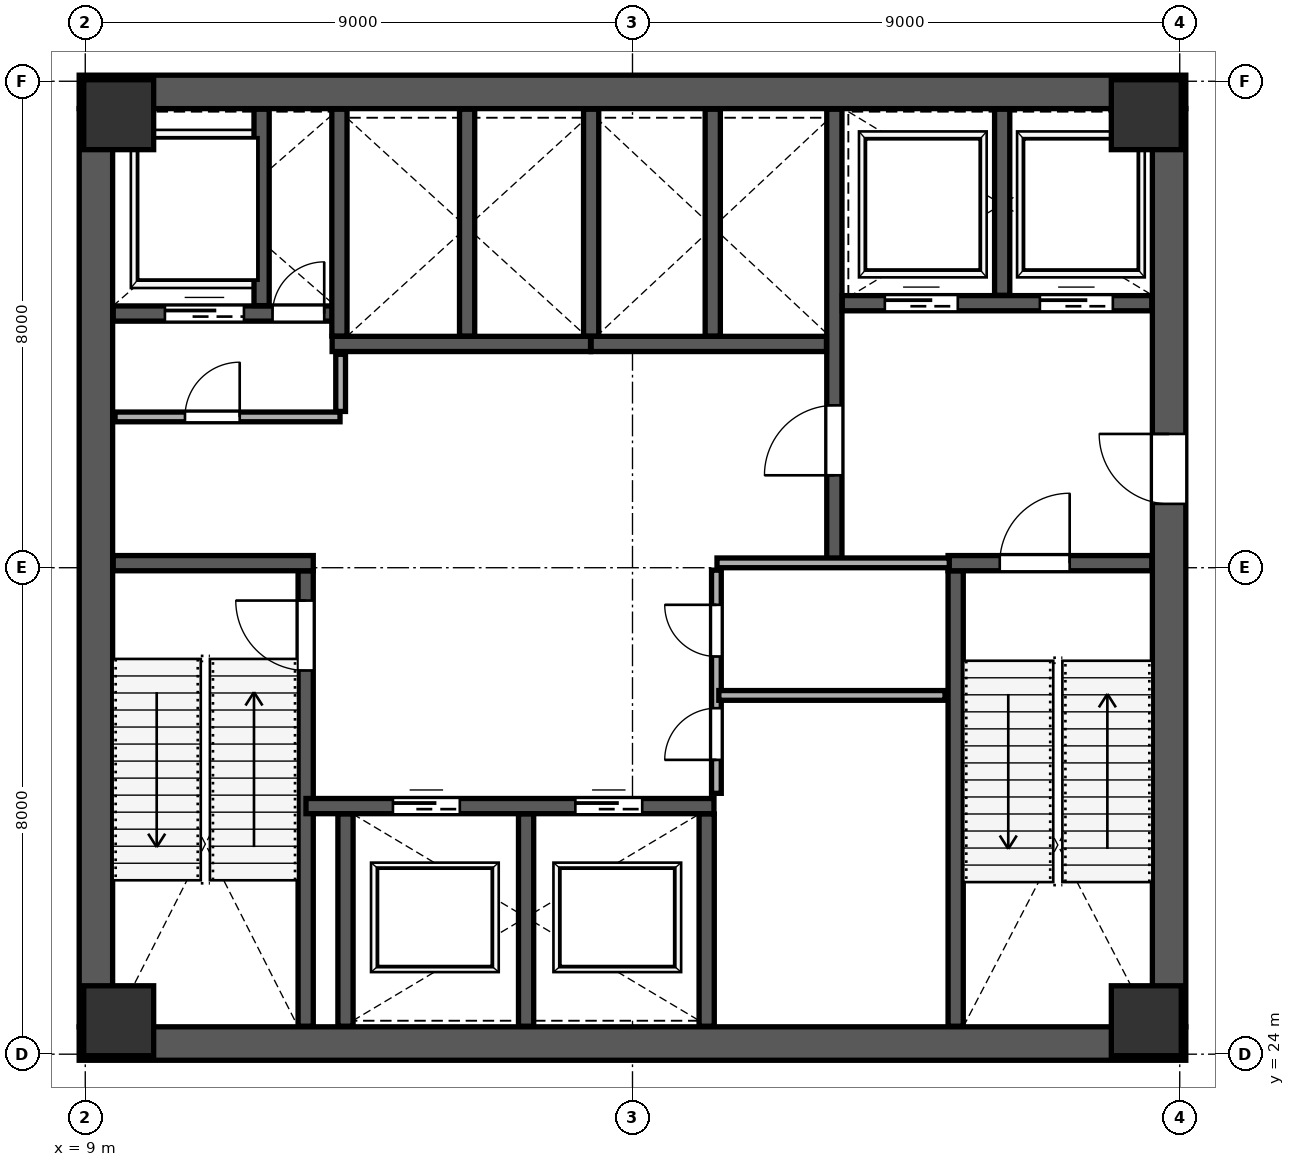
"""IFC4 building model, lengths in metres.
Left out: names, types, materials, properties, quantities, classifications, styles, units other than length and angle.
Written with IfcOpenShell. Run it as: python <this file> out.ifc"""

import sys

from ifc_helpers import new_model, si_unit, direction, frame, frame_2d, origin, origin_2d, place, context, subcontext, project, spatial, rectangle, extrude, source, transform, mapped, element, fill, save


model = new_model("IFC4")
c1 = context("Model", 3, precision=1e-05, world=origin(), true_north=direction((0.0, 1.0)))
c2 = subcontext(c1, "Body", "Model", "MODEL_VIEW")
j1 = project(units=[si_unit("LENGTHUNIT", "METRE"), si_unit("PLANEANGLEUNIT", "RADIAN")], contexts=[c1])
p1 = place(None, origin())
s1 = spatial("IfcSite", under=j1, at=p1, CompositionType="ELEMENT")
p2 = place(p1, origin())
s2 = spatial("IfcBuilding", under=s1, at=p2, CompositionType="ELEMENT")
p3 = place(p2, frame((0.0, 0.0, 56.8)))
s3 = spatial("IfcBuildingStorey", under=s2, at=p3, CompositionType="ELEMENT", Elevation=56.8)
m1 = source(origin(), c2, "Body", "SweptSolid", [
    extrude(rectangle(XDim=1.15, YDim=1.15, at=origin_2d()), origin(), (0.0, 0.0, 1.0), 4.799),
])
for number, where, z_axis, x_axis in (
    (1, (9.55, 24.55, 0.001), (0.0, 0.0, 1.0), (1.0, 0.0, 0.0)),
    (2, (26.45, 24.55, 0.001), (0.0, 0.0, 1.0), (1.0, 0.0, 0.0)),
    (3, (9.55, 39.45, 0.001), (0.0, 0.0, 1.0), (1.0, 0.0, 0.0)),
    (4, (26.45, 39.45, 0.001), (0.0, 0.0, 1.0), (1.0, 0.0, 0.0)),
):
    element("IfcColumn", number, at=place(p3, frame(where, z_axis=z_axis, x_axis=x_axis)), inside=s3, PredefinedType="COLUMN", context=c2, shape_type="MappedRepresentation", body=[
        mapped(m1, transform((0.0, 0.0, 0.0), scale=1.0)),
    ])
p4 = place(p3, frame((9.175, 24.45, 0.0), z_axis=(0.0, 0.0, 1.0), x_axis=(0.0, 1.0, 0.0)))
e5 = element("IfcWall", 5, at=p4, inside=s3, PredefinedType="SHEAR", context=c2, shape_type="SweptSolid", body=[
    extrude(rectangle(XDim=15.1, YDim=0.55, at=frame_2d((7.55, 0.0))), origin(), (0.0, 0.0, 1.0), 4.56),
])
p5 = place(p3, frame((26.825, 24.45, 0.0), z_axis=(0.0, 0.0, 1.0), x_axis=(0.0, 1.0, 0.0)))
e6 = element("IfcWall", 6, at=p5, inside=s3, PredefinedType="SHEAR", context=c2, shape_type="SweptSolid", body=[
    extrude(rectangle(XDim=15.1, YDim=0.55, at=frame_2d((7.55, 0.0))), origin(), (0.0, 0.0, 1.0), 4.56),
])
p6 = place(p5, frame((8.6, 0.0, 0.0)))
e7 = element("IfcOpeningElement", 7, at=p6, cuts=e6, PredefinedType="OPENING", context=c2, shape_type="SweptSolid", body=[
    extrude(rectangle(XDim=1.15, YDim=2.2, at=frame_2d((0.575, 1.1))), frame((0.0, 0.285, 0.0), z_axis=(0.0, -1.0, 0.0), x_axis=(1.0, 0.0, 0.0)), (0.0, 0.0, 1.0), 0.57),
])
for number, where, z_axis, x_axis in (
    (8, (8.9, 24.175, 0.0), (0.0, 0.0, 1.0), (1.0, 0.0, 0.0)),
    (9, (8.9, 39.825, 0.0), (0.0, 0.0, 1.0), (1.0, 0.0, 0.0)),
):
    element("IfcWall", number, at=place(p3, frame(where, z_axis=z_axis, x_axis=x_axis)), inside=s3, PredefinedType="SHEAR", context=c2, shape_type="SweptSolid", body=[
        extrude(rectangle(XDim=18.2, YDim=0.55, at=frame_2d((9.1, 0.0))), origin(), (0.0, 0.0, 1.0), 4.56),
    ])
p7 = place(p3, frame((12.625, 24.46, 0.0), z_axis=(0.0, 0.0, 1.0), x_axis=(0.0, 1.0, 0.0)))
e10 = element("IfcWall", 10, at=p7, inside=s3, PredefinedType="SHEAR", context=c2, shape_type="SweptSolid", body=[
    extrude(rectangle(XDim=7.49, YDim=0.25, at=frame_2d((3.745, 0.0))), origin(), (0.0, 0.0, 1.0), 4.56),
])
p8 = place(p7, frame((5.85, 0.0, 0.0)))
e11 = element("IfcOpeningElement", 11, at=p8, cuts=e10, PredefinedType="OPENING", context=c2, shape_type="SweptSolid", body=[
    extrude(rectangle(XDim=1.15, YDim=2.2, at=frame_2d((0.575, 1.1))), frame((0.0, 0.135, 0.0), z_axis=(0.0, -1.0, 0.0), x_axis=(1.0, 0.0, 0.0)), (0.0, 0.0, 1.0), 0.27),
])
p9 = place(p3, frame((9.46, 32.075, 0.0), z_axis=(0.0, 0.0, 1.0), x_axis=(1.0, 0.0, 0.0)))
e12 = element("IfcWall", 12, at=p9, inside=s3, PredefinedType="SHEAR", context=c2, shape_type="SweptSolid", body=[
    extrude(rectangle(XDim=3.29, YDim=0.25, at=frame_2d((1.645, 0.0))), origin(), (0.0, 0.0, 1.0), 4.56),
])
p10 = place(p3, frame((23.315, 24.46, 0.0), z_axis=(0.0, 0.0, 1.0), x_axis=(0.0, 1.0, 0.0)))
e13 = element("IfcWall", 13, at=p10, inside=s3, PredefinedType="SHEAR", context=c2, shape_type="SweptSolid", body=[
    extrude(rectangle(XDim=7.49, YDim=0.25, at=frame_2d((3.745, 0.0))), origin(), (0.0, 0.0, 1.0), 4.56),
])
p11 = place(p3, frame((23.19, 32.075, 0.0), z_axis=(0.0, 0.0, 1.0), x_axis=(1.0, 0.0, 0.0)))
e14 = element("IfcWall", 14, at=p11, inside=s3, PredefinedType="SHEAR", context=c2, shape_type="SweptSolid", body=[
    extrude(rectangle(XDim=3.35, YDim=0.25, at=frame_2d((1.675, 0.0))), origin(), (0.0, 0.0, 1.0), 4.56),
])
p12 = place(p11, frame((0.85, 0.0, 0.0)))
e15 = element("IfcOpeningElement", 15, at=p12, cuts=e14, PredefinedType="OPENING", context=c2, shape_type="SweptSolid", body=[
    extrude(rectangle(XDim=1.15, YDim=2.2, at=frame_2d((0.575, 1.1))), frame((0.0, 0.135, 0.0), z_axis=(0.0, -1.0, 0.0), x_axis=(1.0, 0.0, 0.0)), (0.0, 0.0, 1.0), 0.27),
])
p13 = place(p3, frame((21.32, 32.12, 0.0), z_axis=(0.0, 0.0, 1.0), x_axis=(0.0, 1.0, 0.0)))
e16 = element("IfcWall", 16, at=p13, inside=s3, PredefinedType="SHEAR", context=c2, shape_type="SweptSolid", body=[
    extrude(rectangle(XDim=7.42, YDim=0.25, at=frame_2d((3.71, 0.0))), origin(), (0.0, 0.0, 1.0), 4.56),
])
p14 = place(p13, frame((1.4, 0.0, 0.0)))
e17 = element("IfcOpeningElement", 17, at=p14, cuts=e16, PredefinedType="OPENING", context=c2, shape_type="SweptSolid", body=[
    extrude(rectangle(XDim=1.15, YDim=2.2, at=frame_2d((0.575, 1.1))), frame((0.0, 0.135, 0.0), z_axis=(0.0, -1.0, 0.0), x_axis=(1.0, 0.0, 0.0)), (0.0, 0.0, 1.0), 0.27),
])
p15 = place(p3, frame((9.46, 36.18, 0.0), z_axis=(0.0, 0.0, 1.0), x_axis=(1.0, 0.0, 0.0)))
e18 = element("IfcWall", 18, at=p15, inside=s3, PredefinedType="SHEAR", context=c2, shape_type="SweptSolid", body=[
    extrude(rectangle(XDim=3.79, YDim=0.25, at=frame_2d((1.895, 0.0))), origin(), (0.0, 0.0, 1.0), 4.56),
])
p16 = place(p15, frame((2.62, 0.0, 0.0)))
e19 = element("IfcOpeningElement", 19, at=p16, cuts=e18, PredefinedType="OPENING", context=c2, shape_type="SweptSolid", body=[
    extrude(rectangle(XDim=0.85, YDim=2.1, at=frame_2d((0.425, 1.05))), frame((0.0, 0.135, 0.0), z_axis=(0.0, -1.0, 0.0), x_axis=(1.0, 0.0, 0.0)), (0.0, 0.0, 1.0), 0.27),
])
p17 = place(p15, frame((0.85, 0.0, 0.0)))
e20 = element("IfcOpeningElement", 20, at=p17, cuts=e18, PredefinedType="OPENING", context=c2, shape_type="SweptSolid", body=[
    extrude(rectangle(XDim=1.3, YDim=2.25, at=frame_2d((0.65, 1.125))), frame((0.0, 0.135, 0.0), z_axis=(0.0, -1.0, 0.0), x_axis=(1.0, 0.0, 0.0)), (0.0, 0.0, 1.0), 0.27),
])
p18 = place(p3, frame((11.9, 36.31, 0.0), z_axis=(0.0, 0.0, 1.0), x_axis=(0.0, 1.0, 0.0)))
e21 = element("IfcWall", 21, at=p18, inside=s3, PredefinedType="SHEAR", context=c2, shape_type="SweptSolid", body=[
    extrude(rectangle(XDim=3.23, YDim=0.25, at=frame_2d((1.615, 0.0))), origin(), (0.0, 0.0, 1.0), 4.56),
])
p19 = place(p3, frame((21.45, 36.35, 0.0), z_axis=(0.0, 0.0, 1.0), x_axis=(1.0, 0.0, 0.0)))
e22 = element("IfcWall", 22, at=p19, inside=s3, PredefinedType="SHEAR", context=c2, shape_type="SweptSolid", body=[
    extrude(rectangle(XDim=5.09, YDim=0.25, at=frame_2d((2.545, 0.0))), origin(), (0.0, 0.0, 1.0), 4.56),
])
p20 = place(p19, frame((0.7, 0.0, 0.0)))
e23 = element("IfcOpeningElement", 23, at=p20, cuts=e22, PredefinedType="OPENING", context=c2, shape_type="SweptSolid", body=[
    extrude(rectangle(XDim=1.2, YDim=2.2, at=frame_2d((0.6, 1.1))), frame((0.0, 0.135, 0.0), z_axis=(0.0, -1.0, 0.0), x_axis=(1.0, 0.0, 0.0)), (0.0, 0.0, 1.0), 0.27),
])
p21 = place(p19, frame((3.25, 0.0, 0.0)))
e24 = element("IfcOpeningElement", 24, at=p21, cuts=e22, PredefinedType="OPENING", context=c2, shape_type="SweptSolid", body=[
    extrude(rectangle(XDim=1.2, YDim=2.2, at=frame_2d((0.6, 1.1))), frame((0.0, 0.135, 0.0), z_axis=(0.0, -1.0, 0.0), x_axis=(1.0, 0.0, 0.0)), (0.0, 0.0, 1.0), 0.27),
])
p22 = place(p3, frame((24.08, 36.48, 0.0), z_axis=(0.0, 0.0, 1.0), x_axis=(0.0, 1.0, 0.0)))
e25 = element("IfcWall", 25, at=p22, inside=s3, PredefinedType="SHEAR", context=c2, shape_type="SweptSolid", body=[
    extrude(rectangle(XDim=3.06, YDim=0.25, at=frame_2d((1.53, 0.0))), origin(), (0.0, 0.0, 1.0), 4.56),
])
p23 = place(p3, frame((12.63, 28.08, 0.0), z_axis=(0.0, 0.0, 1.0), x_axis=(1.0, 0.0, 0.0)))
e26 = element("IfcWall", 26, at=p23, inside=s3, PredefinedType="SHEAR", context=c2, shape_type="SweptSolid", body=[
    extrude(rectangle(XDim=6.71, YDim=0.25, at=frame_2d((3.355, 0.0))), origin(), (0.0, 0.0, 1.0), 4.56),
])
p24 = place(p23, frame((1.43, 0.0, 0.0)))
e27 = element("IfcOpeningElement", 27, at=p24, cuts=e26, PredefinedType="OPENING", context=c2, shape_type="SweptSolid", body=[
    extrude(rectangle(XDim=1.1, YDim=2.2, at=frame_2d((0.55, 1.1))), frame((0.0, 0.135, 0.0), z_axis=(0.0, -1.0, 0.0), x_axis=(1.0, 0.0, 0.0)), (0.0, 0.0, 1.0), 0.27),
])
p25 = place(p23, frame((4.43, 0.0, 0.0)))
e28 = element("IfcOpeningElement", 28, at=p25, cuts=e26, PredefinedType="OPENING", context=c2, shape_type="SweptSolid", body=[
    extrude(rectangle(XDim=1.1, YDim=2.2, at=frame_2d((0.55, 1.1))), frame((0.0, 0.135, 0.0), z_axis=(0.0, -1.0, 0.0), x_axis=(1.0, 0.0, 0.0)), (0.0, 0.0, 1.0), 0.27),
])
for number, where, z_axis, x_axis in (
    (29, (13.28, 24.46, 0.0), (0.0, 0.0, 1.0), (0.0, 1.0, 0.0)),
    (30, (16.25, 24.46, 0.0), (0.0, 0.0, 1.0), (0.0, 1.0, 0.0)),
    (31, (19.22, 24.46, 0.0), (0.0, 0.0, 1.0), (0.0, 1.0, 0.0)),
):
    element("IfcWall", number, at=place(p3, frame(where, z_axis=z_axis, x_axis=x_axis)), inside=s3, PredefinedType="SHEAR", context=c2, shape_type="SweptSolid", body=[
        extrude(rectangle(XDim=3.49, YDim=0.25, at=frame_2d((1.745, 0.0))), origin(), (0.0, 0.0, 1.0), 4.56),
    ])
p26 = place(p3, frame((13.06, 35.68, 0.0), z_axis=(0.0, 0.0, 1.0), x_axis=(1.0, 0.0, 0.0)))
e32 = element("IfcWall", 32, at=p26, inside=s3, PredefinedType="SHEAR", context=c2, shape_type="SweptSolid", body=[
    extrude(rectangle(XDim=4.25, YDim=0.25, at=frame_2d((2.125, 0.0))), origin(), (0.0, 0.0, 1.0), 4.56),
])
for number, where, z_axis, x_axis in (
    (33, (13.18, 35.81, 0.0), (0.0, 0.0, 1.0), (0.0, 1.0, 0.0)),
    (34, (15.28, 35.81, 0.0), (0.0, 0.0, 1.0), (0.0, 1.0, 0.0)),
):
    element("IfcWall", number, at=place(p3, frame(where, z_axis=z_axis, x_axis=x_axis)), inside=s3, PredefinedType="SHEAR", context=c2, shape_type="SweptSolid", body=[
        extrude(rectangle(XDim=3.73, YDim=0.25, at=frame_2d((1.865, 0.0))), origin(), (0.0, 0.0, 1.0), 4.56),
    ])
p27 = place(p3, frame((17.32, 35.68, 0.0), z_axis=(0.0, 0.0, 1.0), x_axis=(1.0, 0.0, 0.0)))
e35 = element("IfcWall", 35, at=p27, inside=s3, PredefinedType="SHEAR", context=c2, shape_type="SweptSolid", body=[
    extrude(rectangle(XDim=3.87, YDim=0.25, at=frame_2d((1.935, 0.0))), origin(), (0.0, 0.0, 1.0), 4.56),
])
for number, where, z_axis, x_axis in (
    (36, (17.32, 35.81, 0.0), (0.0, 0.0, 1.0), (0.0, 1.0, 0.0)),
    (37, (19.32, 35.81, 0.0), (0.0, 0.0, 1.0), (0.0, 1.0, 0.0)),
):
    element("IfcWall", number, at=place(p3, frame(where, z_axis=z_axis, x_axis=x_axis)), inside=s3, PredefinedType="SHEAR", context=c2, shape_type="SweptSolid", body=[
        extrude(rectangle(XDim=3.73, YDim=0.25, at=frame_2d((1.865, 0.0))), origin(), (0.0, 0.0, 1.0), 4.56),
    ])
p28 = place(p3, frame((9.49, 34.48, 0.0), z_axis=(0.0, 0.0, 1.0), x_axis=(1.0, 0.0, 0.0)))
e38 = element("IfcWall", 38, at=p28, inside=s3, PredefinedType="PARTITIONING", context=c2, shape_type="SweptSolid", body=[
    extrude(rectangle(XDim=3.7, YDim=0.16, at=frame_2d((1.85, 0.0))), origin(), (0.0, 0.0, 1.0), 4.56),
])
p29 = place(p28, frame((1.15, 0.0, 0.0)))
e39 = element("IfcOpeningElement", 39, at=p29, cuts=e38, PredefinedType="OPENING", context=c2, shape_type="SweptSolid", body=[
    extrude(rectangle(XDim=0.9, YDim=2.15, at=frame_2d((0.45, 1.075))), frame((0.0, 0.09, 0.0), z_axis=(0.0, -1.0, 0.0), x_axis=(1.0, 0.0, 0.0)), (0.0, 0.0, 1.0), 0.18),
])
p30 = place(p3, frame((13.2, 34.57, 0.0), z_axis=(0.0, 0.0, 1.0), x_axis=(0.0, 1.0, 0.0)))
e40 = element("IfcWall", 40, at=p30, inside=s3, PredefinedType="PARTITIONING", context=c2, shape_type="SweptSolid", body=[
    extrude(rectangle(XDim=0.94, YDim=0.16, at=frame_2d((0.47, 0.0))), origin(), (0.0, 0.0, 1.0), 4.56),
])
p31 = place(p3, frame((19.39, 32.08, 0.0), z_axis=(0.0, 0.0, 1.0), x_axis=(1.0, 0.0, 0.0)))
e41 = element("IfcWall", 41, at=p31, inside=s3, PredefinedType="PARTITIONING", context=c2, shape_type="SweptSolid", body=[
    extrude(rectangle(XDim=3.82, YDim=0.16, at=frame_2d((1.91, 0.0))), origin(), (0.0, 0.0, 1.0), 4.56),
])
p32 = place(p3, frame((19.38, 28.29, 0.0), z_axis=(0.0, 0.0, 1.0), x_axis=(0.0, 1.0, 0.0)))
e42 = element("IfcWall", 42, at=p32, inside=s3, PredefinedType="PARTITIONING", context=c2, shape_type="SweptSolid", body=[
    extrude(rectangle(XDim=3.67, YDim=0.16, at=frame_2d((1.835, 0.0))), origin(), (0.0, 0.0, 1.0), 4.56),
])
p33 = place(p32, frame((0.55, 0.0, 0.0)))
e43 = element("IfcOpeningElement", 43, at=p33, cuts=e42, PredefinedType="OPENING", context=c2, shape_type="SweptSolid", body=[
    extrude(rectangle(XDim=0.85, YDim=2.1, at=frame_2d((0.425, 1.05))), frame((0.0, 0.09, 0.0), z_axis=(0.0, -1.0, 0.0), x_axis=(1.0, 0.0, 0.0)), (0.0, 0.0, 1.0), 0.18),
])
p34 = place(p32, frame((2.25, 0.0, 0.0)))
e44 = element("IfcOpeningElement", 44, at=p34, cuts=e42, PredefinedType="OPENING", context=c2, shape_type="SweptSolid", body=[
    extrude(rectangle(XDim=0.85, YDim=2.1, at=frame_2d((0.425, 1.05))), frame((0.0, 0.09, 0.0), z_axis=(0.0, -1.0, 0.0), x_axis=(1.0, 0.0, 0.0)), (0.0, 0.0, 1.0), 0.18),
])
p35 = place(p3, frame((19.42, 29.9, 0.0), z_axis=(0.0, 0.0, 1.0), x_axis=(1.0, 0.0, 0.0)))
e45 = element("IfcWall", 45, at=p35, inside=s3, PredefinedType="PARTITIONING", context=c2, shape_type="SweptSolid", body=[
    extrude(rectangle(XDim=3.72, YDim=0.16, at=frame_2d((1.86, 0.0))), origin(), (0.0, 0.0, 1.0), 4.56),
])
m2 = source(origin(), c2, "Body", "SweptSolid", [
    extrude(rectangle(XDim=1.15, YDim=2.2, at=frame_2d((0.575, 1.1))), frame((0.0, 0.025, 0.0), z_axis=(0.0, -1.0, 0.0), x_axis=(1.0, 0.0, 0.0)), (0.0, 0.0, 1.0), 0.05),
])
p36 = place(p8, origin())
e46 = element("IfcDoor", 46, at=p36, inside=s3, OperationType="SINGLE_SWING_RIGHT", PredefinedType="DOOR", context=c2, shape_type="MappedRepresentation", body=[
    mapped(m2, transform((0.0, 0.0, 0.0), scale=1.0)),
])
fill(e11, e46)
m3 = source(origin(), c2, "Body", "SweptSolid", [
    extrude(rectangle(XDim=1.15, YDim=2.2, at=frame_2d((0.575, 1.1))), frame((0.0, 0.025, 0.0), z_axis=(0.0, -1.0, 0.0), x_axis=(1.0, 0.0, 0.0)), (0.0, 0.0, 1.0), 0.05),
])
p37 = place(p14, origin())
e47 = element("IfcDoor", 47, at=p37, inside=s3, OperationType="SINGLE_SWING_LEFT", PredefinedType="DOOR", context=c2, shape_type="MappedRepresentation", body=[
    mapped(m3, transform((0.0, 0.0, 0.0), scale=1.0)),
])
fill(e17, e47)
p38 = place(p12, origin())
e48 = element("IfcDoor", 48, at=p38, inside=s3, OperationType="SINGLE_SWING_RIGHT", PredefinedType="DOOR", context=c2, shape_type="MappedRepresentation", body=[
    mapped(m2, transform((0.0, 0.0, 0.0), scale=1.0)),
])
fill(e15, e48)
p39 = place(p6, origin())
e49 = element("IfcDoor", 49, at=p39, inside=s3, OperationType="SINGLE_SWING_RIGHT", PredefinedType="DOOR", context=c2, shape_type="MappedRepresentation", body=[
    mapped(m3, transform((0.0, 0.0, 0.0), scale=1.0)),
])
fill(e7, e49)
m4 = source(origin(), c2, "Body", "SweptSolid", [
    extrude(rectangle(XDim=0.85, YDim=2.1, at=frame_2d((0.425, 1.05))), frame((0.0, 0.025, 0.0), z_axis=(0.0, -1.0, 0.0), x_axis=(1.0, 0.0, 0.0)), (0.0, 0.0, 1.0), 0.05),
])
p40 = place(p16, origin())
e50 = element("IfcDoor", 50, at=p40, inside=s3, OperationType="SINGLE_SWING_RIGHT", PredefinedType="DOOR", context=c2, shape_type="MappedRepresentation", body=[
    mapped(m4, transform((0.0, 0.0, 0.0), scale=1.0)),
])
fill(e19, e50)
m5 = source(origin(), c2, "Body", "SweptSolid", [
    extrude(rectangle(XDim=1.1, YDim=2.2, at=frame_2d((0.55, 1.1))), frame((0.0, 0.025, 0.0), z_axis=(0.0, -1.0, 0.0), x_axis=(1.0, 0.0, 0.0)), (0.0, 0.0, 1.0), 0.05),
])
p41 = place(p24, origin())
e51 = element("IfcDoor", 51, at=p41, inside=s3, OperationType="SLIDING_TO_LEFT", PredefinedType="DOOR", context=c2, shape_type="MappedRepresentation", body=[
    mapped(m5, transform((0.0, 0.0, 0.0), scale=1.0)),
])
fill(e27, e51)
p42 = place(p25, origin())
e52 = element("IfcDoor", 52, at=p42, inside=s3, OperationType="SLIDING_TO_RIGHT", PredefinedType="DOOR", context=c2, shape_type="MappedRepresentation", body=[
    mapped(m5, transform((0.0, 0.0, 0.0), scale=1.0)),
])
fill(e28, e52)
m6 = source(origin(), c2, "Body", "SweptSolid", [
    extrude(rectangle(XDim=1.2, YDim=2.2, at=frame_2d((0.6, 1.1))), frame((0.0, 0.025, 0.0), z_axis=(0.0, -1.0, 0.0), x_axis=(1.0, 0.0, 0.0)), (0.0, 0.0, 1.0), 0.05),
])
p43 = place(p20, origin())
e53 = element("IfcDoor", 53, at=p43, inside=s3, OperationType="SLIDING_TO_LEFT", PredefinedType="DOOR", context=c2, shape_type="MappedRepresentation", body=[
    mapped(m6, transform((0.0, 0.0, 0.0), scale=1.0)),
])
fill(e23, e53)
p44 = place(p21, origin())
e54 = element("IfcDoor", 54, at=p44, inside=s3, OperationType="SLIDING_TO_RIGHT", PredefinedType="DOOR", context=c2, shape_type="MappedRepresentation", body=[
    mapped(m6, transform((0.0, 0.0, 0.0), scale=1.0)),
])
fill(e24, e54)
m7 = source(origin(), c2, "Body", "SweptSolid", [
    extrude(rectangle(XDim=1.3, YDim=2.25, at=frame_2d((0.65, 1.125))), frame((0.0, 0.025, 0.0), z_axis=(0.0, -1.0, 0.0), x_axis=(1.0, 0.0, 0.0)), (0.0, 0.0, 1.0), 0.05),
])
p45 = place(p17, origin())
e55 = element("IfcDoor", 55, at=p45, inside=s3, OperationType="SLIDING_TO_LEFT", PredefinedType="DOOR", context=c2, shape_type="MappedRepresentation", body=[
    mapped(m7, transform((0.0, 0.0, 0.0), scale=1.0)),
])
fill(e20, e55)
m8 = source(origin(), c2, "Body", "SweptSolid", [
    extrude(rectangle(XDim=0.9, YDim=2.15, at=frame_2d((0.45, 1.075))), frame((0.0, 0.025, 0.0), z_axis=(0.0, -1.0, 0.0), x_axis=(1.0, 0.0, 0.0)), (0.0, 0.0, 1.0), 0.05),
])
p46 = place(p29, origin())
e56 = element("IfcDoor", 56, at=p46, inside=s3, OperationType="SINGLE_SWING_RIGHT", PredefinedType="DOOR", context=c2, shape_type="MappedRepresentation", body=[
    mapped(m8, transform((0.0, 0.0, 0.0), scale=1.0)),
])
fill(e39, e56)
p47 = place(p33, origin())
e57 = element("IfcDoor", 57, at=p47, inside=s3, OperationType="SINGLE_SWING_LEFT", PredefinedType="DOOR", context=c2, shape_type="MappedRepresentation", body=[
    mapped(m4, transform((0.0, 0.0, 0.0), scale=1.0)),
])
fill(e43, e57)
p48 = place(p34, origin())
e58 = element("IfcDoor", 58, at=p48, inside=s3, OperationType="SINGLE_SWING_RIGHT", PredefinedType="DOOR", context=c2, shape_type="MappedRepresentation", body=[
    mapped(m4, transform((0.0, 0.0, 0.0), scale=1.0)),
])
fill(e44, e58)
save(model, sys.argv[1])
